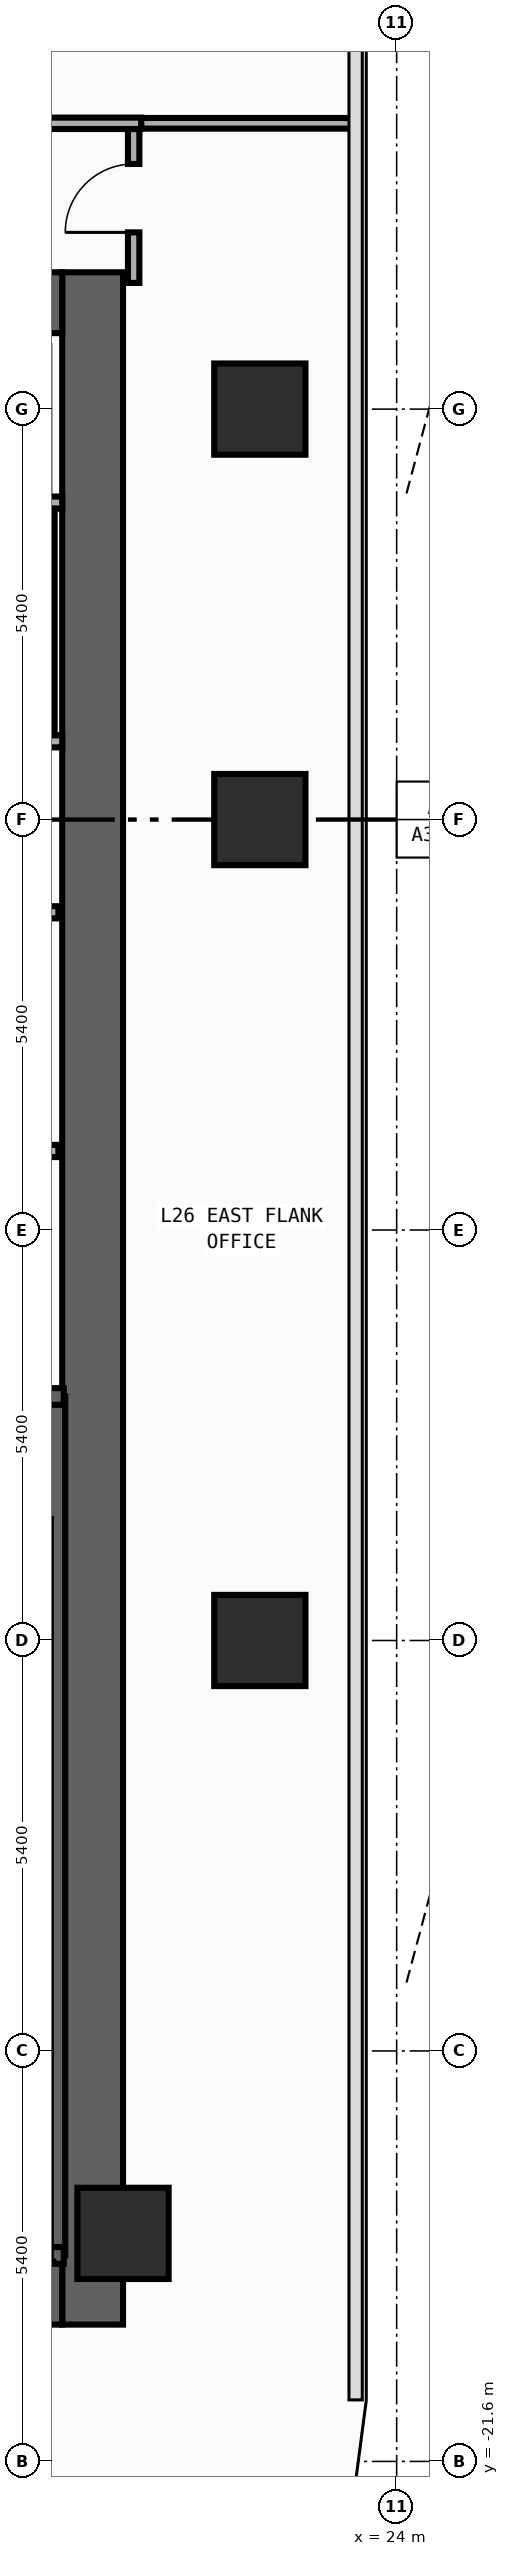
"""IFC4 building model, lengths in metres.
Left out: names, types, materials, properties, quantities, classifications, styles, units other than length and angle.
Written with IfcOpenShell. Run it as: python <this file> out.ifc"""

import sys

from ifc_helpers import new_model, si_unit, direction, frame, frame_2d, origin, origin_2d, place, context, subcontext, project, spatial, rectangle, extrude, element, fill, save


model = new_model("IFC4")
c1 = context("Model", 3, precision=1e-05, world=origin(), true_north=direction((0.0, 1.0)))
c2 = subcontext(c1, "Body", "Model", "MODEL_VIEW")
j1 = project(units=[si_unit("LENGTHUNIT", "METRE"), si_unit("PLANEANGLEUNIT", "RADIAN")], contexts=[c1])
p1 = place(None, origin())
s1 = spatial("IfcSite", under=j1, at=p1, CompositionType="ELEMENT")
p2 = place(p1, origin())
s2 = spatial("IfcBuilding", under=s1, at=p2, CompositionType="ELEMENT")
p3 = place(p2, frame((0.0, 0.0, 114.2)))
s3 = spatial("IfcBuildingStorey", under=s2, at=p3, CompositionType="ELEMENT", Elevation=114.2)
p4 = place(p3, frame((20.0, -19.8, 0.0), z_axis=(0.0, 0.0, 1.0), x_axis=(0.0, 1.0, 0.0)))
e1 = element("IfcWall", 1, at=p4, inside=s3, PredefinedType="SHEAR", context=c2, shape_type="SweptSolid", body=[
    extrude(rectangle(XDim=27.0, YDim=0.8, at=frame_2d((13.5, 0.0))), origin(), (0.0, 0.0, 1.0), 3.94),
])
for number, where, z_axis, x_axis in (
    (2, (12.8, -19.4, 0.0), (0.0, 0.0, 1.0), (1.0, 0.0, 0.0)),
    (3, (12.8, 6.8, 0.0), (0.0, 0.0, 1.0), (1.0, 0.0, 0.0)),
):
    element("IfcWall", number, at=place(p3, frame(where, z_axis=z_axis, x_axis=x_axis)), inside=s3, PredefinedType="SHEAR", context=c2, shape_type="SweptSolid", body=[
        extrude(rectangle(XDim=6.8, YDim=0.8, at=frame_2d((3.4, 0.0))), origin(), (0.0, 0.0, 1.0), 3.94),
    ])
p5 = place(p3, frame((19.53, -18.89, 0.0), z_axis=(0.0, 0.0, 1.0), x_axis=(0.0, 1.0, 0.0)))
e4 = element("IfcWall", 4, at=p5, inside=s3, PredefinedType="SHEAR", context=c2, shape_type="SweptSolid", body=[
    extrude(rectangle(XDim=11.3, YDim=0.22, at=frame_2d((5.65, 0.0))), origin(), (0.0, 0.0, 1.0), 3.94),
])
p6 = place(p3, frame((15.705, -18.89, 0.0), z_axis=(0.0, 0.0, 1.0), x_axis=(1.0, 0.0, 0.0)))
e5 = element("IfcWall", 5, at=p6, inside=s3, PredefinedType="SHEAR", context=c2, shape_type="SweptSolid", body=[
    extrude(rectangle(XDim=3.915, YDim=0.22, at=frame_2d((1.958, 0.0))), origin(), (0.0, 0.0, 1.0), 3.94),
])
p7 = place(p3, frame((19.62, -7.59, 0.0), z_axis=(0.0, 0.0, 1.0), x_axis=(-1.0, 0.0, 0.0)))
e6 = element("IfcWall", 6, at=p7, inside=s3, PredefinedType="SHEAR", context=c2, shape_type="SweptSolid", body=[
    extrude(rectangle(XDim=3.915, YDim=0.22, at=frame_2d((1.958, 0.0))), origin(), (0.0, 0.0, 1.0), 3.94),
])
p8 = place(p7, frame((1.08, 0.0, 0.0)))
e7 = element("IfcOpeningElement", 7, at=p8, cuts=e6, PredefinedType="OPENING", context=c2, shape_type="SweptSolid", body=[
    extrude(rectangle(XDim=1.1, YDim=2.2, at=frame_2d((0.55, 1.1))), frame((0.0, 0.12, 0.0), z_axis=(0.0, -1.0, 0.0), x_axis=(1.0, 0.0, 0.0)), (0.0, 0.0, 1.0), 0.24),
])
for number, where, z_axis, x_axis in (
    (8, (20.4, -18.6, 0.0), (0.0, 0.0, 1.0), (1.0, 0.0, 0.0)),
    (9, (22.2, -10.8, 0.0), (0.0, 0.0, 1.0), (1.0, 0.0, 0.0)),
    (10, (22.2, 0.0, 0.0), (0.0, 0.0, 1.0), (1.0, 0.0, 0.0)),
    (11, (22.2, 5.4, 0.0), (0.0, 0.0, 1.0), (1.0, 0.0, 0.0)),
):
    element("IfcColumn", number, at=place(p3, frame(where, z_axis=z_axis, x_axis=x_axis)), inside=s3, PredefinedType="COLUMN", context=c2, shape_type="SweptSolid", body=[
        extrude(rectangle(XDim=1.2, YDim=1.2, at=origin_2d()), origin(), (0.0, 0.0, 1.0), 4.2),
    ])
p9 = place(p3, frame((15.75, -4.36, 0.0), z_axis=(0.0, 0.0, 1.0), x_axis=(1.0, 0.0, 0.0)))
e12 = element("IfcWall", 12, at=p9, inside=s3, PredefinedType="STANDARD", context=c2, shape_type="SweptSolid", body=[
    extrude(rectangle(XDim=3.8, YDim=0.16, at=frame_2d((1.9, 0.0))), origin(), (0.0, 0.0, 1.0), 3.94),
])
p10 = place(p9, frame((1.47, 0.0, 0.0)))
e13 = element("IfcOpeningElement", 13, at=p10, cuts=e12, PredefinedType="OPENING", context=c2, shape_type="SweptSolid", body=[
    extrude(rectangle(XDim=1.15, YDim=2.2, at=frame_2d((0.575, 1.1))), frame((0.0, 0.09, 0.0), z_axis=(0.0, -1.0, 0.0), x_axis=(1.0, 0.0, 0.0)), (0.0, 0.0, 1.0), 0.18),
])
p11 = place(p3, frame((15.75, -1.22, 0.0), z_axis=(0.0, 0.0, 1.0), x_axis=(1.0, 0.0, 0.0)))
e14 = element("IfcWall", 14, at=p11, inside=s3, PredefinedType="STANDARD", context=c2, shape_type="SweptSolid", body=[
    extrude(rectangle(XDim=3.8, YDim=0.16, at=frame_2d((1.9, 0.0))), origin(), (0.0, 0.0, 1.0), 3.94),
])
for number, where, z_axis, x_axis in (
    (15, (17.31, 4.17, 0.0), (0.0, 0.0, 1.0), (1.0, 0.0, 0.0)),
    (16, (17.31, 1.03, 0.0), (0.0, 0.0, 1.0), (1.0, 0.0, 0.0)),
):
    element("IfcWall", number, at=place(p3, frame(where, z_axis=z_axis, x_axis=x_axis)), inside=s3, PredefinedType="PARTITIONING", context=c2, shape_type="SweptSolid", body=[
        extrude(rectangle(XDim=2.29, YDim=0.16, at=frame_2d((1.145, 0.0))), origin(), (0.0, 0.0, 1.0), 3.94),
    ])
p12 = place(p3, frame((20.54, 7.06, 0.0), z_axis=(0.0, 0.0, 1.0), x_axis=(0.0, 1.0, 0.0)))
e17 = element("IfcWall", 17, at=p12, inside=s3, PredefinedType="PARTITIONING", context=c2, shape_type="SweptSolid", body=[
    extrude(rectangle(XDim=2.025, YDim=0.15, at=frame_2d((1.012, 0.0))), origin(), (0.0, 0.0, 1.0), 3.94),
])
p13 = place(p12, frame((0.665, 0.0, 0.0)))
e18 = element("IfcOpeningElement", 18, at=p13, cuts=e17, PredefinedType="OPENING", context=c2, shape_type="SweptSolid", body=[
    extrude(rectangle(XDim=0.9, YDim=2.15, at=frame_2d((0.45, 1.075))), frame((0.0, 0.085, 0.0), z_axis=(0.0, -1.0, 0.0), x_axis=(1.0, 0.0, 0.0)), (0.0, 0.0, 1.0), 0.17),
])
p14 = place(p3, frame((11.81, 9.16, 0.0), z_axis=(0.0, 0.0, 1.0), x_axis=(1.0, 0.0, 0.0)))
e19 = element("IfcWall", 19, at=p14, inside=s3, PredefinedType="PARTITIONING", context=c2, shape_type="SweptSolid", body=[
    extrude(rectangle(XDim=8.83, YDim=0.15, at=frame_2d((4.415, 0.0))), origin(), (0.0, 0.0, 1.0), 3.94),
])
p15 = place(p14, frame((5.067, 0.0, 0.0)))
e20 = element("IfcOpeningElement", 20, at=p15, cuts=e19, PredefinedType="OPENING", context=c2, shape_type="SweptSolid", body=[
    extrude(rectangle(XDim=0.9, YDim=2.15, at=frame_2d((0.45, 1.075))), frame((0.0, 0.085, 0.0), z_axis=(0.0, -1.0, 0.0), x_axis=(1.0, 0.0, 0.0)), (0.0, 0.0, 1.0), 0.17),
])
p16 = place(p3, frame((20.64, 9.16, 0.0), z_axis=(0.0, 0.0, 1.0), x_axis=(1.0, 0.0, 0.0)))
e21 = element("IfcWall", 21, at=p16, inside=s3, PredefinedType="PARTITIONING", context=c2, shape_type="SweptSolid", body=[
    extrude(rectangle(XDim=2.815, YDim=0.14, at=frame_2d((1.408, 0.0))), origin(), (0.0, 0.0, 1.0), 3.94),
])
p17 = place(p3, frame((19.45, 4.09, 0.0), z_axis=(0.0, 0.0, 1.0), x_axis=(0.0, -1.0, 0.0)))
e22 = element("IfcWall", 22, at=p17, inside=s3, PredefinedType="PARTITIONING", context=c2, shape_type="SweptSolid", body=[
    extrude(rectangle(XDim=2.98, YDim=0.1, at=frame_2d((1.49, 0.0))), origin(), (0.0, 0.0, 1.0), 3.94),
])
p18 = place(p13, origin())
e23 = element("IfcDoor", 23, at=p18, inside=s3, OperationType="SINGLE_SWING_LEFT", PredefinedType="DOOR", context=c2, shape_type="SweptSolid", body=[
    extrude(rectangle(XDim=0.9, YDim=2.15, at=frame_2d((0.45, 1.075))), frame((0.0, 0.025, 0.0), z_axis=(0.0, -1.0, 0.0), x_axis=(1.0, 0.0, 0.0)), (0.0, 0.0, 1.0), 0.05),
])
fill(e18, e23)
save(model, sys.argv[1])
